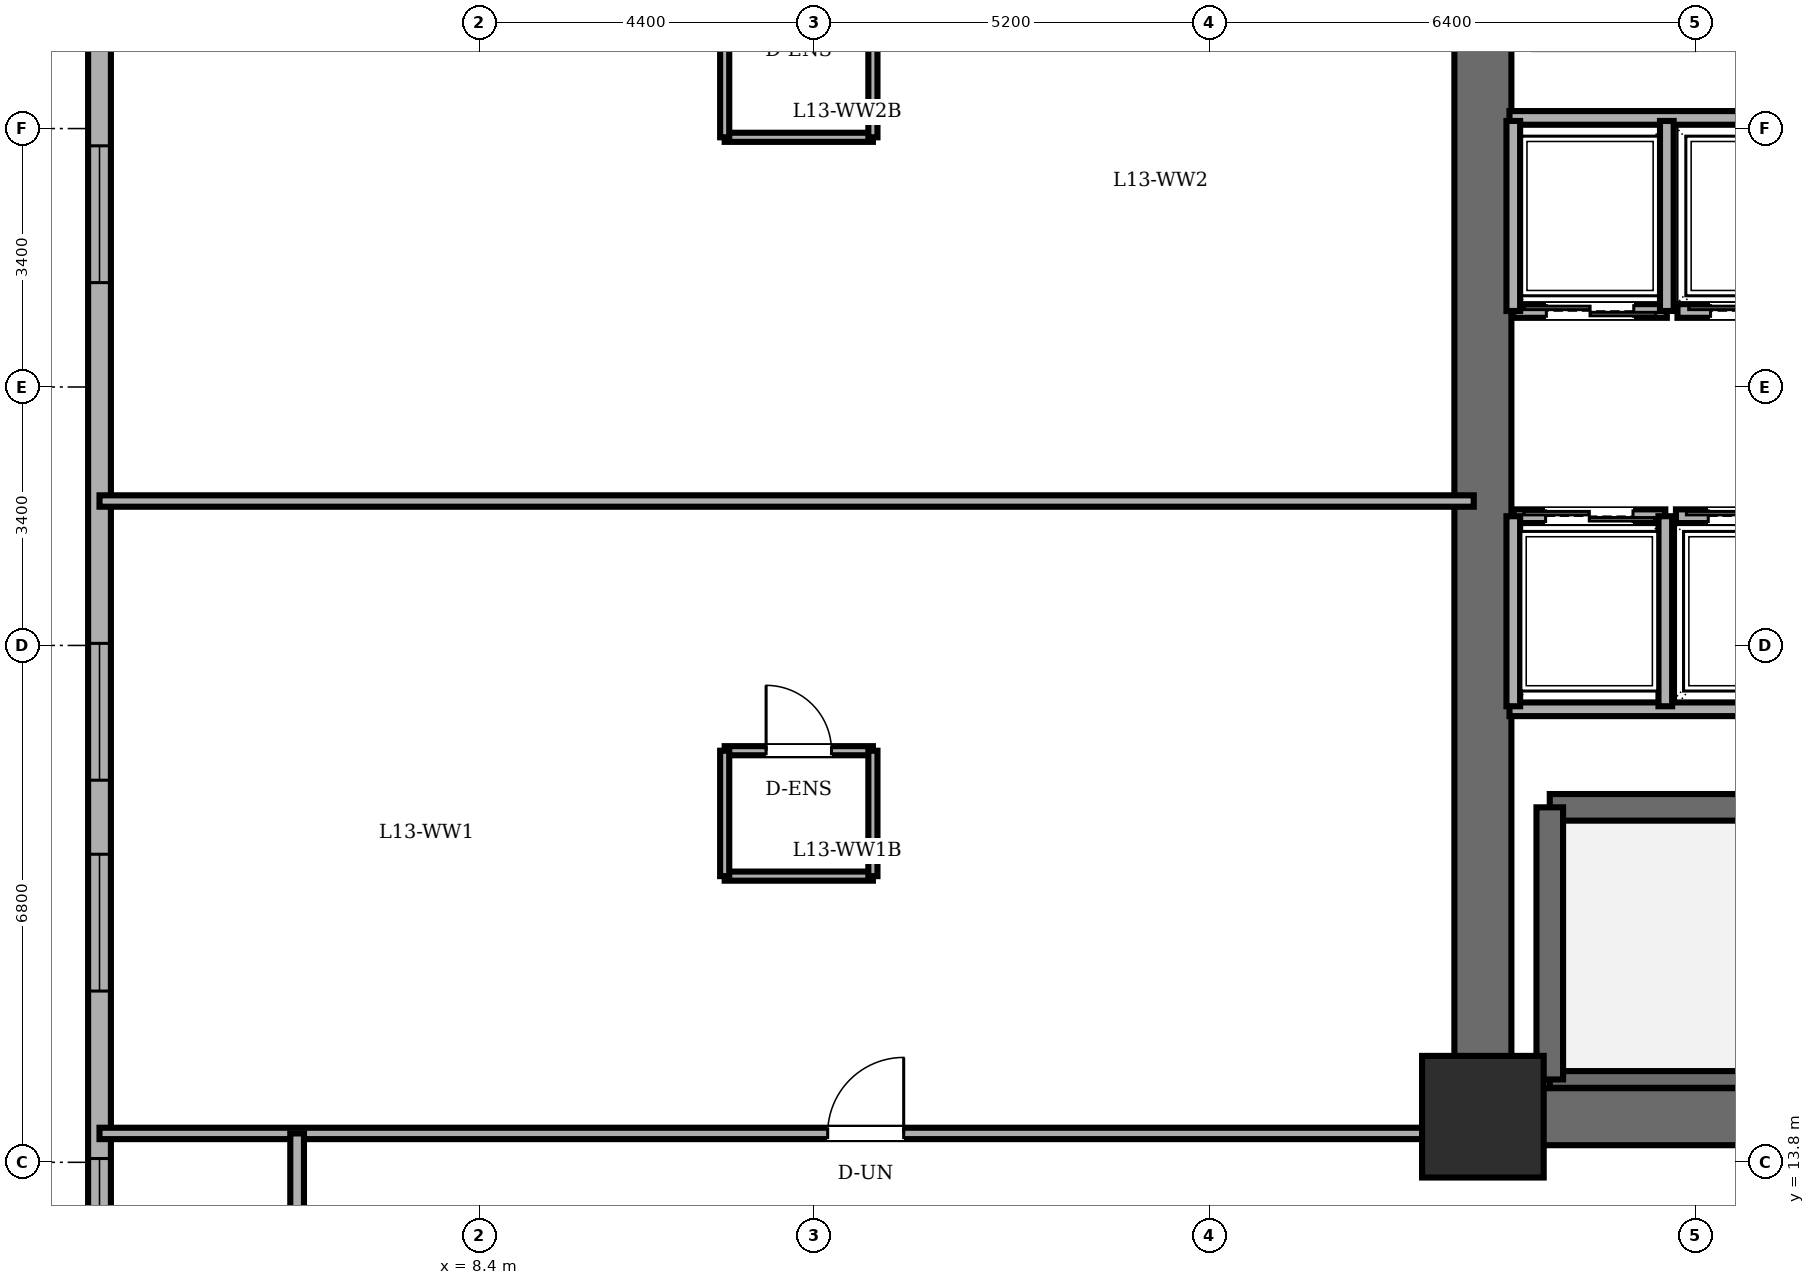
"""IFC4 building model, lengths in metres.
Left out: names, types, materials, properties, quantities, classifications, styles, units other than length and angle.
Written with IfcOpenShell. Run it as: python <this file> out.ifc"""

import sys

from ifc_helpers import new_model, si_unit, direction, frame, frame_2d, origin, origin_2d, place, context, subcontext, project, spatial, rectangle, extrude, element, fill, save


model = new_model("IFC4")
c1 = context("Model", 3, precision=1e-05, world=origin(), true_north=direction((0.0, 1.0)))
c2 = subcontext(c1, "Body", "Model", "MODEL_VIEW")
j1 = project(units=[si_unit("LENGTHUNIT", "METRE"), si_unit("PLANEANGLEUNIT", "RADIAN")], contexts=[c1])
p1 = place(None, origin())
s1 = spatial("IfcSite", under=j1, at=p1, CompositionType="ELEMENT")
p2 = place(p1, origin())
s2 = spatial("IfcBuilding", under=s1, at=p2, CompositionType="ELEMENT")
p3 = place(p2, frame((0.0, 0.0, 50.4)))
s3 = spatial("IfcBuildingStorey", under=s2, at=p3, CompositionType="ELEMENT", Elevation=50.4)
p4 = place(p3, frame((21.6, 14.4, 0.0), z_axis=(0.0, 0.0, 1.0), x_axis=(1.0, 0.0, 0.0)))
e1 = element("IfcColumn", 1, at=p4, inside=s3, PredefinedType="COLUMN", context=c2, shape_type="SweptSolid", body=[
    extrude(rectangle(XDim=1.6, YDim=1.6, at=origin_2d()), origin(), (0.0, 0.0, 1.0), 3.6),
])
p5 = place(p3, frame((3.4, 40.2, 0.0), z_axis=(0.0, 0.0, 1.0), x_axis=(0.0, -1.0, 0.0)))
e2 = element("IfcWall", 2, at=p5, inside=s3, PredefinedType="SOLIDWALL", context=c2, shape_type="SweptSolid", body=[
    extrude(rectangle(XDim=32.4, YDim=0.3, at=frame_2d((16.2, 0.0))), origin(), (0.0, 0.0, 1.0), 3.4),
])
p6 = place(p5, frame((1.235, 0.0, 0.85)))
e3 = element("IfcOpeningElement", 3, at=p6, cuts=e2, PredefinedType="OPENING", context=c2, shape_type="SweptSolid", body=[
    extrude(rectangle(XDim=1.8, YDim=1.55, at=frame_2d((0.9, 0.775))), frame((0.0, 0.16, 0.0), z_axis=(0.0, -1.0, 0.0), x_axis=(1.0, 0.0, 0.0)), (0.0, 0.0, 1.0), 0.32),
])
p7 = place(p5, frame((4.25, 0.0, 0.85)))
e4 = element("IfcOpeningElement", 4, at=p7, cuts=e2, PredefinedType="OPENING", context=c2, shape_type="SweptSolid", body=[
    extrude(rectangle(XDim=1.8, YDim=1.55, at=frame_2d((0.9, 0.775))), frame((0.0, 0.16, 0.0), z_axis=(0.0, -1.0, 0.0), x_axis=(1.0, 0.0, 0.0)), (0.0, 0.0, 1.0), 0.32),
])
p8 = place(p5, frame((9.253, 0.0, 0.85)))
e5 = element("IfcOpeningElement", 5, at=p8, cuts=e2, PredefinedType="OPENING", context=c2, shape_type="SweptSolid", body=[
    extrude(rectangle(XDim=1.8, YDim=1.55, at=frame_2d((0.9, 0.775))), frame((0.0, 0.16, 0.0), z_axis=(0.0, -1.0, 0.0), x_axis=(1.0, 0.0, 0.0)), (0.0, 0.0, 1.0), 0.32),
])
p9 = place(p5, frame((13.027, 0.0, 0.85)))
e6 = element("IfcOpeningElement", 6, at=p9, cuts=e2, PredefinedType="OPENING", context=c2, shape_type="SweptSolid", body=[
    extrude(rectangle(XDim=1.8, YDim=1.55, at=frame_2d((0.9, 0.775))), frame((0.0, 0.16, 0.0), z_axis=(0.0, -1.0, 0.0), x_axis=(1.0, 0.0, 0.0)), (0.0, 0.0, 1.0), 0.32),
])
p10 = place(p5, frame((19.573, 0.0, 0.85)))
e7 = element("IfcOpeningElement", 7, at=p10, cuts=e2, PredefinedType="OPENING", context=c2, shape_type="SweptSolid", body=[
    extrude(rectangle(XDim=1.8, YDim=1.55, at=frame_2d((0.9, 0.775))), frame((0.0, 0.16, 0.0), z_axis=(0.0, -1.0, 0.0), x_axis=(1.0, 0.0, 0.0)), (0.0, 0.0, 1.0), 0.32),
])
p11 = place(p5, frame((22.347, 0.0, 0.85)))
e8 = element("IfcOpeningElement", 8, at=p11, cuts=e2, PredefinedType="OPENING", context=c2, shape_type="SweptSolid", body=[
    extrude(rectangle(XDim=1.8, YDim=1.55, at=frame_2d((0.9, 0.775))), frame((0.0, 0.16, 0.0), z_axis=(0.0, -1.0, 0.0), x_axis=(1.0, 0.0, 0.0)), (0.0, 0.0, 1.0), 0.32),
])
p12 = place(p5, frame((26.35, 0.0, 0.85)))
e9 = element("IfcOpeningElement", 9, at=p12, cuts=e2, PredefinedType="OPENING", context=c2, shape_type="SweptSolid", body=[
    extrude(rectangle(XDim=1.8, YDim=1.55, at=frame_2d((0.9, 0.775))), frame((0.0, 0.16, 0.0), z_axis=(0.0, -1.0, 0.0), x_axis=(1.0, 0.0, 0.0)), (0.0, 0.0, 1.0), 0.32),
])
p13 = place(p5, frame((29.365, 0.0, 0.85)))
e10 = element("IfcOpeningElement", 10, at=p13, cuts=e2, PredefinedType="OPENING", context=c2, shape_type="SweptSolid", body=[
    extrude(rectangle(XDim=1.8, YDim=1.55, at=frame_2d((0.9, 0.775))), frame((0.0, 0.16, 0.0), z_axis=(0.0, -1.0, 0.0), x_axis=(1.0, 0.0, 0.0)), (0.0, 0.0, 1.0), 0.32),
])
p14 = place(p3, frame((21.6, 14.4, 0.0), z_axis=(0.0, 0.0, 1.0), x_axis=(0.0, 1.0, 0.0)))
e11 = element("IfcWall", 11, at=p14, inside=s3, PredefinedType="SHEAR", context=c2, shape_type="SweptSolid", body=[
    extrude(rectangle(XDim=19.2, YDim=0.75, at=frame_2d((9.6, 0.0))), origin(), (0.0, 0.0, 1.0), 3.4),
])
p15 = place(p3, frame((37.2, 14.4, 0.0), z_axis=(0.0, 0.0, 1.0), x_axis=(-1.0, 0.0, 0.0)))
e12 = element("IfcWall", 12, at=p15, inside=s3, PredefinedType="SHEAR", context=c2, shape_type="SweptSolid", body=[
    extrude(rectangle(XDim=15.6, YDim=0.75, at=frame_2d((7.8, 0.0))), origin(), (0.0, 0.0, 1.0), 3.4),
])
p16 = place(p3, frame((22.48, 18.47, 0.0), z_axis=(0.0, 0.0, 1.0), x_axis=(1.0, 0.0, 0.0)))
e13 = element("IfcWall", 13, at=p16, inside=s3, PredefinedType="SOLIDWALL", context=c2, shape_type="SweptSolid", body=[
    extrude(rectangle(XDim=7.79, YDim=0.35, at=frame_2d((3.895, 0.0))), origin(), (0.0, 0.0, 1.0), 3.4),
])
p17 = place(p3, frame((22.48, 14.89, 0.0), z_axis=(0.0, 0.0, 1.0), x_axis=(1.0, 0.0, 0.0)))
e14 = element("IfcWall", 14, at=p17, inside=s3, PredefinedType="PARTITIONING", context=c2, shape_type="SweptSolid", body=[
    extrude(rectangle(XDim=7.79, YDim=0.22, at=frame_2d((3.895, 0.0))), origin(), (0.0, 0.0, 1.0), 3.4),
])
p18 = place(p3, frame((22.48, 14.89, 0.0), z_axis=(0.0, 0.0, 1.0), x_axis=(0.0, 1.0, 0.0)))
e15 = element("IfcWall", 15, at=p18, inside=s3, PredefinedType="SOLIDWALL", context=c2, shape_type="SweptSolid", body=[
    extrude(rectangle(XDim=3.58, YDim=0.35, at=frame_2d((1.79, 0.0))), origin(), (0.0, 0.0, 1.0), 3.4),
])
p19 = place(p3, frame((21.95, 27.54, 0.0), z_axis=(0.0, 0.0, 1.0), x_axis=(1.0, 0.0, 0.0)))
e16 = element("IfcWall", 16, at=p19, inside=s3, PredefinedType="PARTITIONING", context=c2, shape_type="SweptSolid", body=[
    extrude(rectangle(XDim=10.56, YDim=0.18, at=frame_2d((5.28, 0.0))), origin(), (0.0, 0.0, 1.0), 3.4),
])
p20 = place(p3, frame((21.95, 19.76, 0.0), z_axis=(0.0, 0.0, 1.0), x_axis=(1.0, 0.0, 0.0)))
e17 = element("IfcWall", 17, at=p20, inside=s3, PredefinedType="PARTITIONING", context=c2, shape_type="SweptSolid", body=[
    extrude(rectangle(XDim=14.87, YDim=0.18, at=frame_2d((7.435, 0.0))), origin(), (0.0, 0.0, 1.0), 3.4),
])
p21 = place(p3, frame((24.02, 25.0, 0.0), z_axis=(0.0, 0.0, 1.0), x_axis=(-1.0, 0.0, 0.0)))
e18 = element("IfcWall", 18, at=p21, inside=s3, PredefinedType="PARTITIONING", context=c2, shape_type="SweptSolid", body=[
    extrude(rectangle(XDim=2.02, YDim=0.18, at=frame_2d((1.01, 0.0))), origin(), (0.0, 0.0, 1.0), 3.4),
])
p22 = place(p21, frame((0.435, 0.0, 0.0)))
e19 = element("IfcOpeningElement", 19, at=p22, cuts=e18, PredefinedType="OPENING", context=c2, shape_type="SweptSolid", body=[
    extrude(rectangle(XDim=1.15, YDim=2.2, at=frame_2d((0.575, 1.1))), frame((0.0, 0.1, 0.0), z_axis=(0.0, -1.0, 0.0), x_axis=(1.0, 0.0, 0.0)), (0.0, 0.0, 1.0), 0.2),
])
for number, where, z_axis, x_axis in (
    (20, (24.02, 25.0, 0.0), (0.0, 0.0, 1.0), (0.0, 1.0, 0.0)),
    (21, (22.0, 27.5, 0.0), (0.0, 0.0, 1.0), (0.0, -1.0, 0.0)),
):
    element("IfcWall", number, at=place(p3, frame(where, z_axis=z_axis, x_axis=x_axis)), inside=s3, PredefinedType="PARTITIONING", context=c2, shape_type="SweptSolid", body=[
        extrude(rectangle(XDim=2.5, YDim=0.18, at=frame_2d((1.25, 0.0))), origin(), (0.0, 0.0, 1.0), 3.4),
    ])
p23 = place(p3, frame((26.18, 25.0, 0.0), z_axis=(0.0, 0.0, 1.0), x_axis=(-1.0, 0.0, 0.0)))
e22 = element("IfcWall", 22, at=p23, inside=s3, PredefinedType="PARTITIONING", context=c2, shape_type="SweptSolid", body=[
    extrude(rectangle(XDim=2.02, YDim=0.18, at=frame_2d((1.01, 0.0))), origin(), (0.0, 0.0, 1.0), 3.4),
])
p24 = place(p23, frame((0.435, 0.0, 0.0)))
e23 = element("IfcOpeningElement", 23, at=p24, cuts=e22, PredefinedType="OPENING", context=c2, shape_type="SweptSolid", body=[
    extrude(rectangle(XDim=1.15, YDim=2.2, at=frame_2d((0.575, 1.1))), frame((0.0, 0.1, 0.0), z_axis=(0.0, -1.0, 0.0), x_axis=(1.0, 0.0, 0.0)), (0.0, 0.0, 1.0), 0.2),
])
p25 = place(p3, frame((22.0, 22.3, 0.0), z_axis=(0.0, 0.0, 1.0), x_axis=(1.0, 0.0, 0.0)))
e24 = element("IfcWall", 24, at=p25, inside=s3, PredefinedType="PARTITIONING", context=c2, shape_type="SweptSolid", body=[
    extrude(rectangle(XDim=2.0, YDim=0.18, at=frame_2d((1.0, 0.0))), origin(), (0.0, 0.0, 1.0), 3.4),
])
p26 = place(p25, frame((0.425, 0.0, 0.0)))
e25 = element("IfcOpeningElement", 25, at=p26, cuts=e24, PredefinedType="OPENING", context=c2, shape_type="SweptSolid", body=[
    extrude(rectangle(XDim=1.15, YDim=2.2, at=frame_2d((0.575, 1.1))), frame((0.0, 0.1, 0.0), z_axis=(0.0, -1.0, 0.0), x_axis=(1.0, 0.0, 0.0)), (0.0, 0.0, 1.0), 0.2),
])
for number, where, z_axis, x_axis in (
    (26, (24.0, 19.8, 0.0), (0.0, 0.0, 1.0), (0.0, 1.0, 0.0)),
    (27, (22.0, 22.3, 0.0), (0.0, 0.0, 1.0), (0.0, -1.0, 0.0)),
):
    element("IfcWall", number, at=place(p3, frame(where, z_axis=z_axis, x_axis=x_axis)), inside=s3, PredefinedType="PARTITIONING", context=c2, shape_type="SweptSolid", body=[
        extrude(rectangle(XDim=2.5, YDim=0.18, at=frame_2d((1.25, 0.0))), origin(), (0.0, 0.0, 1.0), 3.4),
    ])
p27 = place(p3, frame((24.14, 22.3, 0.0), z_axis=(0.0, 0.0, 1.0), x_axis=(1.0, 0.0, 0.0)))
e28 = element("IfcWall", 28, at=p27, inside=s3, PredefinedType="PARTITIONING", context=c2, shape_type="SweptSolid", body=[
    extrude(rectangle(XDim=2.0, YDim=0.18, at=frame_2d((1.0, 0.0))), origin(), (0.0, 0.0, 1.0), 3.4),
])
p28 = place(p27, frame((0.425, 0.0, 0.0)))
e29 = element("IfcOpeningElement", 29, at=p28, cuts=e28, PredefinedType="OPENING", context=c2, shape_type="SweptSolid", body=[
    extrude(rectangle(XDim=1.15, YDim=2.2, at=frame_2d((0.575, 1.1))), frame((0.0, 0.1, 0.0), z_axis=(0.0, -1.0, 0.0), x_axis=(1.0, 0.0, 0.0)), (0.0, 0.0, 1.0), 0.2),
])
p29 = place(p3, frame((11.625, 19.215, 0.0), z_axis=(0.0, 0.0, 1.0), x_axis=(1.0, 0.0, 0.0)))
e30 = element("IfcWall", 30, at=p29, inside=s3, PredefinedType="PARTITIONING", context=c2, shape_type="SweptSolid", body=[
    extrude(rectangle(XDim=1.95, YDim=0.12, at=frame_2d((0.975, 0.0))), origin(), (0.0, 0.0, 1.0), 3.4),
])
p30 = place(p29, frame((0.545, 0.0, 0.0)))
e31 = element("IfcOpeningElement", 31, at=p30, cuts=e30, PredefinedType="OPENING", context=c2, shape_type="SweptSolid", body=[
    extrude(rectangle(XDim=0.86, YDim=2.1, at=frame_2d((0.43, 1.05))), frame((0.0, 0.07, 0.0), z_axis=(0.0, -1.0, 0.0), x_axis=(1.0, 0.0, 0.0)), (0.0, 0.0, 1.0), 0.14),
])
p31 = place(p3, frame((13.575, 17.565, 0.0), z_axis=(0.0, 0.0, 1.0), x_axis=(-1.0, 0.0, 0.0)))
e32 = element("IfcWall", 32, at=p31, inside=s3, PredefinedType="PARTITIONING", context=c2, shape_type="SweptSolid", body=[
    extrude(rectangle(XDim=1.95, YDim=0.12, at=frame_2d((0.975, 0.0))), origin(), (0.0, 0.0, 1.0), 3.4),
])
for number, where, z_axis, x_axis in (
    (33, (11.625, 19.215, 0.0), (0.0, 0.0, 1.0), (0.0, -1.0, 0.0)),
    (34, (13.575, 17.565, 0.0), (0.0, 0.0, 1.0), (0.0, 1.0, 0.0)),
):
    element("IfcWall", number, at=place(p3, frame(where, z_axis=z_axis, x_axis=x_axis)), inside=s3, PredefinedType="PARTITIONING", context=c2, shape_type="SweptSolid", body=[
        extrude(rectangle(XDim=1.65, YDim=0.12, at=frame_2d((0.825, 0.0))), origin(), (0.0, 0.0, 1.0), 3.4),
    ])
p32 = place(p3, frame((13.575, 27.285, 0.0), z_axis=(0.0, 0.0, 1.0), x_axis=(-1.0, 0.0, 0.0)))
e35 = element("IfcWall", 35, at=p32, inside=s3, PredefinedType="PARTITIONING", context=c2, shape_type="SweptSolid", body=[
    extrude(rectangle(XDim=1.95, YDim=0.12, at=frame_2d((0.975, 0.0))), origin(), (0.0, 0.0, 1.0), 3.4),
])
for number, where, z_axis, x_axis in (
    (36, (11.625, 28.935, 0.0), (0.0, 0.0, 1.0), (0.0, -1.0, 0.0)),
    (37, (13.575, 27.285, 0.0), (0.0, 0.0, 1.0), (0.0, 1.0, 0.0)),
):
    element("IfcWall", number, at=place(p3, frame(where, z_axis=z_axis, x_axis=x_axis)), inside=s3, PredefinedType="PARTITIONING", context=c2, shape_type="SweptSolid", body=[
        extrude(rectangle(XDim=1.65, YDim=0.12, at=frame_2d((0.825, 0.0))), origin(), (0.0, 0.0, 1.0), 3.4),
    ])
p33 = place(p3, frame((3.4, 14.18, 0.0), z_axis=(0.0, 0.0, 1.0), x_axis=(1.0, 0.0, 0.0)))
e38 = element("IfcWall", 38, at=p33, inside=s3, PredefinedType="PARTITIONING", context=c2, shape_type="SweptSolid", body=[
    extrude(rectangle(XDim=18.08, YDim=0.15, at=frame_2d((9.04, 0.0))), origin(), (0.0, 0.0, 1.0), 3.4),
])
p34 = place(p33, frame((9.58, 0.0, 0.0)))
e39 = element("IfcOpeningElement", 39, at=p34, cuts=e38, PredefinedType="OPENING", context=c2, shape_type="SweptSolid", body=[
    extrude(rectangle(XDim=1.0, YDim=2.15, at=frame_2d((0.5, 1.075))), frame((0.0, 0.085, 0.0), z_axis=(0.0, -1.0, 0.0), x_axis=(1.0, 0.0, 0.0)), (0.0, 0.0, 1.0), 0.17),
])
p35 = place(p3, frame((3.4, 22.5, 0.0), z_axis=(0.0, 0.0, 1.0), x_axis=(1.0, 0.0, 0.0)))
e40 = element("IfcWall", 40, at=p35, inside=s3, PredefinedType="PARTITIONING", context=c2, shape_type="SweptSolid", body=[
    extrude(rectangle(XDim=18.08, YDim=0.15, at=frame_2d((9.04, 0.0))), origin(), (0.0, 0.0, 1.0), 3.4),
])
p36 = place(p3, frame((6.0, 11.72, 0.0), z_axis=(0.0, 0.0, 1.0), x_axis=(0.0, 1.0, 0.0)))
e41 = element("IfcWall", 41, at=p36, inside=s3, PredefinedType="PARTITIONING", context=c2, shape_type="SweptSolid", body=[
    extrude(rectangle(XDim=2.46, YDim=0.18, at=frame_2d((1.23, 0.0))), origin(), (0.0, 0.0, 1.0), 3.4),
])
p37 = place(p9, origin())
e42 = element("IfcWindow", 42, at=p37, inside=s3, PartitioningType="DOUBLE_PANEL_VERTICAL", PredefinedType="WINDOW", context=c2, shape_type="SweptSolid", body=[
    extrude(rectangle(XDim=1.8, YDim=1.55, at=frame_2d((0.9, 0.775))), frame((0.0, 0.03, 0.0), z_axis=(0.0, -1.0, 0.0), x_axis=(1.0, 0.0, 0.0)), (0.0, 0.0, 1.0), 0.06),
])
fill(e6, e42)
p38 = place(p10, origin())
e43 = element("IfcWindow", 43, at=p38, inside=s3, PartitioningType="DOUBLE_PANEL_VERTICAL", PredefinedType="WINDOW", context=c2, shape_type="SweptSolid", body=[
    extrude(rectangle(XDim=1.8, YDim=1.55, at=frame_2d((0.9, 0.775))), frame((0.0, 0.03, 0.0), z_axis=(0.0, -1.0, 0.0), x_axis=(1.0, 0.0, 0.0)), (0.0, 0.0, 1.0), 0.06),
])
fill(e7, e43)
p39 = place(p11, origin())
e44 = element("IfcWindow", 44, at=p39, inside=s3, PartitioningType="DOUBLE_PANEL_VERTICAL", PredefinedType="WINDOW", context=c2, shape_type="SweptSolid", body=[
    extrude(rectangle(XDim=1.8, YDim=1.55, at=frame_2d((0.9, 0.775))), frame((0.0, 0.03, 0.0), z_axis=(0.0, -1.0, 0.0), x_axis=(1.0, 0.0, 0.0)), (0.0, 0.0, 1.0), 0.06),
])
fill(e8, e44)
p40 = place(p12, origin())
e45 = element("IfcWindow", 45, at=p40, inside=s3, PartitioningType="DOUBLE_PANEL_VERTICAL", PredefinedType="WINDOW", context=c2, shape_type="SweptSolid", body=[
    extrude(rectangle(XDim=1.8, YDim=1.55, at=frame_2d((0.9, 0.775))), frame((0.0, 0.03, 0.0), z_axis=(0.0, -1.0, 0.0), x_axis=(1.0, 0.0, 0.0)), (0.0, 0.0, 1.0), 0.06),
])
fill(e9, e45)
p41 = place(p22, origin())
e46 = element("IfcDoor", 46, at=p41, inside=s3, OperationType="DOUBLE_DOOR_SLIDING", PredefinedType="DOOR", context=c2, shape_type="SweptSolid", body=[
    extrude(rectangle(XDim=1.15, YDim=2.2, at=frame_2d((0.575, 1.1))), frame((0.0, 0.025, 0.0), z_axis=(0.0, -1.0, 0.0), x_axis=(1.0, 0.0, 0.0)), (0.0, 0.0, 1.0), 0.05),
])
fill(e19, e46)
p42 = place(p24, origin())
e47 = element("IfcDoor", 47, at=p42, inside=s3, OperationType="DOUBLE_DOOR_SLIDING", PredefinedType="DOOR", context=c2, shape_type="SweptSolid", body=[
    extrude(rectangle(XDim=1.15, YDim=2.2, at=frame_2d((0.575, 1.1))), frame((0.0, 0.025, 0.0), z_axis=(0.0, -1.0, 0.0), x_axis=(1.0, 0.0, 0.0)), (0.0, 0.0, 1.0), 0.05),
])
fill(e23, e47)
p43 = place(p26, origin())
e48 = element("IfcDoor", 48, at=p43, inside=s3, OperationType="DOUBLE_DOOR_SLIDING", PredefinedType="DOOR", context=c2, shape_type="SweptSolid", body=[
    extrude(rectangle(XDim=1.15, YDim=2.2, at=frame_2d((0.575, 1.1))), frame((0.0, 0.025, 0.0), z_axis=(0.0, -1.0, 0.0), x_axis=(1.0, 0.0, 0.0)), (0.0, 0.0, 1.0), 0.05),
])
fill(e25, e48)
p44 = place(p28, origin())
e49 = element("IfcDoor", 49, at=p44, inside=s3, OperationType="DOUBLE_DOOR_SLIDING", PredefinedType="DOOR", context=c2, shape_type="SweptSolid", body=[
    extrude(rectangle(XDim=1.15, YDim=2.2, at=frame_2d((0.575, 1.1))), frame((0.0, 0.025, 0.0), z_axis=(0.0, -1.0, 0.0), x_axis=(1.0, 0.0, 0.0)), (0.0, 0.0, 1.0), 0.05),
])
fill(e29, e49)
p45 = place(p30, origin())
e50 = element("IfcDoor", 50, at=p45, inside=s3, OperationType="SINGLE_SWING_LEFT", PredefinedType="DOOR", context=c2, shape_type="SweptSolid", body=[
    extrude(rectangle(XDim=0.86, YDim=2.1, at=frame_2d((0.43, 1.05))), frame((0.0, 0.025, 0.0), z_axis=(0.0, -1.0, 0.0), x_axis=(1.0, 0.0, 0.0)), (0.0, 0.0, 1.0), 0.05),
])
fill(e31, e50)
p46 = place(p34, origin())
e51 = element("IfcDoor", 51, at=p46, inside=s3, OperationType="SINGLE_SWING_RIGHT", PredefinedType="DOOR", context=c2, shape_type="SweptSolid", body=[
    extrude(rectangle(XDim=1.0, YDim=2.15, at=frame_2d((0.5, 1.075))), frame((0.0, 0.025, 0.0), z_axis=(0.0, -1.0, 0.0), x_axis=(1.0, 0.0, 0.0)), (0.0, 0.0, 1.0), 0.05),
])
fill(e39, e51)
save(model, sys.argv[1])
